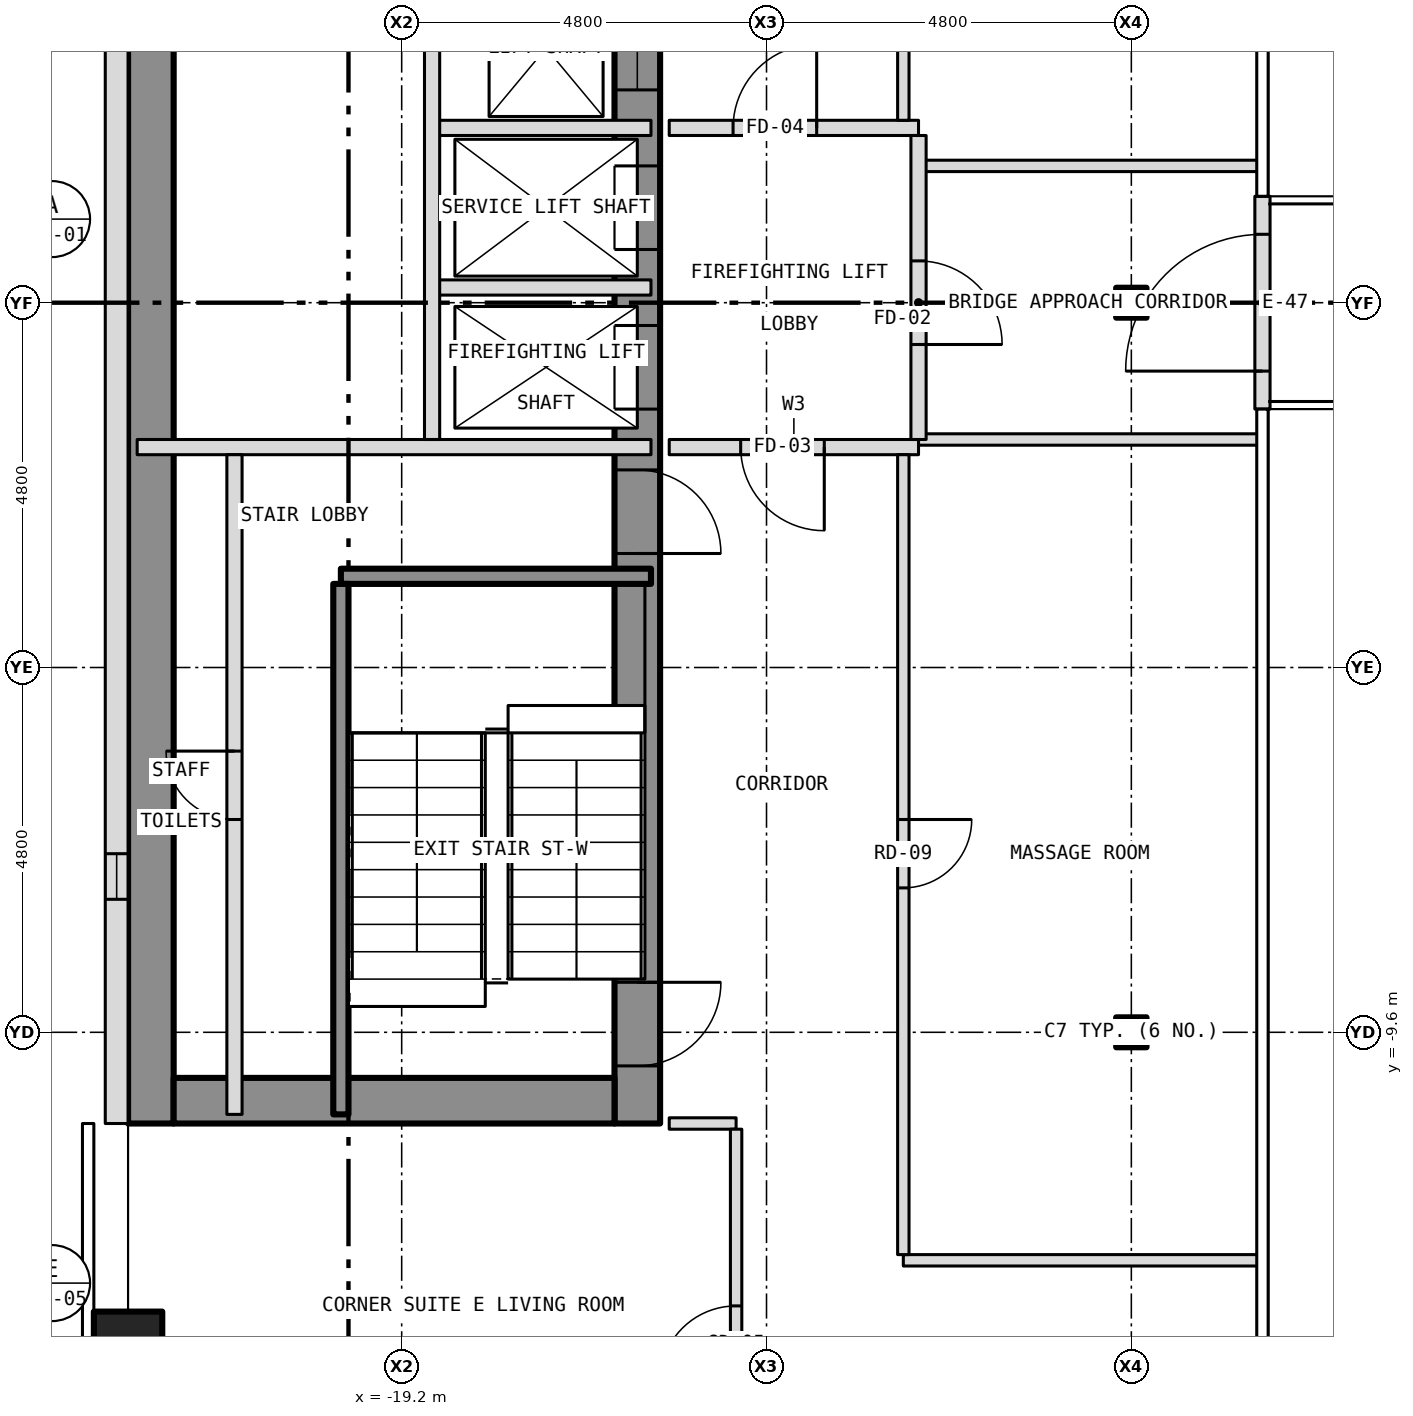
"""IFC4 building model, lengths in metres.
Left out: names, types, materials, properties, quantities, classifications, styles, units other than length and angle.
Written with IfcOpenShell. Run it as: python <this file> out.ifc"""

import sys

from ifc_helpers import new_model, si_unit, direction, frame, frame_2d, origin, origin_2d, place, context, subcontext, project, spatial, rectangle, hollow_rectangle, i_section, extrude, element, fill, save


model = new_model("IFC4")
c1 = context("Model", 3, precision=1e-05, world=origin(), true_north=direction((0.0, 1.0)))
c2 = subcontext(c1, "Body", "Model", "MODEL_VIEW")
j1 = project(units=[si_unit("LENGTHUNIT", "METRE"), si_unit("PLANEANGLEUNIT", "RADIAN")], contexts=[c1])
p1 = place(None, origin())
s1 = spatial("IfcSite", under=j1, at=p1, CompositionType="ELEMENT")
p2 = place(p1, origin())
s2 = spatial("IfcBuilding", under=s1, at=p2, CompositionType="ELEMENT")
p3 = place(p2, frame((0.0, 0.0, 120.5)))
s3 = spatial("IfcBuildingStorey", under=s2, at=p3, CompositionType="ELEMENT", Elevation=120.5)
p4 = place(p3, frame((-22.8, -13.725, -0.15), z_axis=(0.0, 0.0, 1.0), x_axis=(1.0, 0.0, 0.0)))
e1 = element("IfcColumn", 1, at=p4, inside=s3, PredefinedType="COLUMN", context=c2, shape_type="SweptSolid", body=[
    extrude(hollow_rectangle(XDim=0.9, YDim=0.9, WallThickness=0.05, at=origin_2d()), origin(), (0.0, 0.0, 1.0), 3.5),
])
for number, where, z_axis, x_axis in (
    (2, (-9.6, -9.6, -0.15), (0.0, 0.0, 1.0), (1.0, 0.0, 0.0)),
    (3, (-9.6, 0.0, -0.15), (0.0, 0.0, 1.0), (1.0, 0.0, 0.0)),
):
    element("IfcColumn", number, at=place(p3, frame(where, z_axis=z_axis, x_axis=x_axis)), inside=s3, PredefinedType="COLUMN", context=c2, shape_type="SweptSolid", body=[
        extrude(i_section(OverallWidth=0.399, OverallDepth=0.394, WebThickness=0.023, FlangeThickness=0.037, at=origin_2d()), origin(), (0.0, 0.0, 1.0), 3.5),
    ])
p5 = place(p3, frame((-16.1, -10.8, 0.0), z_axis=(0.0, 0.0, 1.0), x_axis=(0.0, 1.0, 0.0)))
e4 = element("IfcWall", 4, at=p5, inside=s3, PredefinedType="SHEAR", context=c2, shape_type="SweptSolid", body=[
    extrude(rectangle(XDim=21.6, YDim=0.6, at=frame_2d((10.8, 0.0))), origin(), (0.0, 0.0, 1.0), 3.25),
])
p6 = place(p5, frame((9.4, 0.0, 0.0)))
e5 = element("IfcOpeningElement", 5, at=p6, cuts=e4, PredefinedType="OPENING", context=c2, shape_type="SweptSolid", body=[
    extrude(rectangle(XDim=1.1, YDim=2.1, at=frame_2d((0.55, 1.05))), frame((0.0, 0.312, 0.0), z_axis=(0.0, -1.0, 0.0), x_axis=(1.0, 0.0, 0.0)), (0.0, 0.0, 1.0), 0.624),
])
p7 = place(p5, frame((11.5, 0.0, 0.0)))
e6 = element("IfcOpeningElement", 6, at=p7, cuts=e4, PredefinedType="OPENING", context=c2, shape_type="SweptSolid", body=[
    extrude(rectangle(XDim=1.1, YDim=2.1, at=frame_2d((0.55, 1.05))), frame((0.0, 0.312, 0.0), z_axis=(0.0, -1.0, 0.0), x_axis=(1.0, 0.0, 0.0)), (0.0, 0.0, 1.0), 0.624),
])
p8 = place(p5, frame((13.6, 0.0, 0.0)))
e7 = element("IfcOpeningElement", 7, at=p8, cuts=e4, PredefinedType="OPENING", context=c2, shape_type="SweptSolid", body=[
    extrude(rectangle(XDim=1.1, YDim=2.1, at=frame_2d((0.55, 1.05))), frame((0.0, 0.312, 0.0), z_axis=(0.0, -1.0, 0.0), x_axis=(1.0, 0.0, 0.0)), (0.0, 0.0, 1.0), 0.624),
])
p9 = place(p5, frame((15.7, 0.0, 0.0)))
e8 = element("IfcOpeningElement", 8, at=p9, cuts=e4, PredefinedType="OPENING", context=c2, shape_type="SweptSolid", body=[
    extrude(rectangle(XDim=1.1, YDim=2.1, at=frame_2d((0.55, 1.05))), frame((0.0, 0.312, 0.0), z_axis=(0.0, -1.0, 0.0), x_axis=(1.0, 0.0, 0.0)), (0.0, 0.0, 1.0), 0.624),
])
p10 = place(p5, frame((17.8, 0.0, 0.0)))
e9 = element("IfcOpeningElement", 9, at=p10, cuts=e4, PredefinedType="OPENING", context=c2, shape_type="SweptSolid", body=[
    extrude(rectangle(XDim=1.1, YDim=2.1, at=frame_2d((0.55, 1.05))), frame((0.0, 0.312, 0.0), z_axis=(0.0, -1.0, 0.0), x_axis=(1.0, 0.0, 0.0)), (0.0, 0.0, 1.0), 0.624),
])
p11 = place(p5, frame((0.758, 0.0, 0.0)))
e10 = element("IfcOpeningElement", 10, at=p11, cuts=e4, PredefinedType="OPENING", context=c2, shape_type="SweptSolid", body=[
    extrude(rectangle(XDim=1.1, YDim=2.1, at=frame_2d((0.55, 1.05))), frame((0.0, 0.312, 0.0), z_axis=(0.0, -1.0, 0.0), x_axis=(1.0, 0.0, 0.0)), (0.0, 0.0, 1.0), 0.624),
])
p12 = place(p5, frame((7.5, 0.0, 0.0)))
e11 = element("IfcOpeningElement", 11, at=p12, cuts=e4, PredefinedType="OPENING", context=c2, shape_type="SweptSolid", body=[
    extrude(rectangle(XDim=1.1, YDim=2.1, at=frame_2d((0.55, 1.05))), frame((0.0, 0.312, 0.0), z_axis=(0.0, -1.0, 0.0), x_axis=(1.0, 0.0, 0.0)), (0.0, 0.0, 1.0), 0.624),
])
p13 = place(p3, frame((-22.5, -10.8, 0.0), z_axis=(0.0, 0.0, 1.0), x_axis=(0.0, 1.0, 0.0)))
e12 = element("IfcWall", 12, at=p13, inside=s3, PredefinedType="SHEAR", context=c2, shape_type="SweptSolid", body=[
    extrude(rectangle(XDim=21.6, YDim=0.6, at=frame_2d((10.8, 0.0))), origin(), (0.0, 0.0, 1.0), 3.25),
])
p14 = place(p3, frame((-22.2, -10.5, 0.0), z_axis=(0.0, 0.0, 1.0), x_axis=(1.0, 0.0, 0.0)))
e13 = element("IfcWall", 13, at=p14, inside=s3, PredefinedType="SHEAR", context=c2, shape_type="SweptSolid", body=[
    extrude(rectangle(XDim=5.8, YDim=0.6, at=frame_2d((2.9, 0.0))), origin(), (0.0, 0.0, 1.0), 3.25),
])
p15 = place(p3, frame((-22.95, 10.8, 0.0), z_axis=(0.0, 0.0, 1.0), x_axis=(0.0, -1.0, 0.0)))
e14 = element("IfcWall", 14, at=p15, inside=s3, PredefinedType="SOLIDWALL", context=c2, shape_type="SweptSolid", body=[
    extrude(rectangle(XDim=21.6, YDim=0.3, at=frame_2d((10.8, 0.0))), origin(), (0.0, 0.0, 1.0), 3.5),
])
p16 = place(p15, frame((18.05, 0.0, 1.0)))
e15 = element("IfcOpeningElement", 15, at=p16, cuts=e14, PredefinedType="OPENING", context=c2, shape_type="SweptSolid", body=[
    extrude(rectangle(XDim=0.6, YDim=1.5, at=frame_2d((0.3, 0.75))), frame((0.0, 0.162, 0.0), z_axis=(0.0, -1.0, 0.0), x_axis=(1.0, 0.0, 0.0)), (0.0, 0.0, 1.0), 0.324),
])
p17 = place(p3, frame((-7.875, -1.4, 0.0), z_axis=(0.0, 0.0, 1.0), x_axis=(0.0, 1.0, 0.0)))
e16 = element("IfcWall", 16, at=p17, inside=s3, PredefinedType="SOLIDWALL", context=c2, shape_type="SweptSolid", body=[
    extrude(rectangle(XDim=2.8, YDim=0.2, at=frame_2d((1.4, 0.0))), origin(), (0.0, 0.0, 1.0), 3.5),
])
p18 = place(p17, frame((0.5, 0.0, 0.0)))
e17 = element("IfcOpeningElement", 17, at=p18, cuts=e16, PredefinedType="OPENING", context=c2, shape_type="SweptSolid", body=[
    extrude(rectangle(XDim=1.8, YDim=2.1, at=frame_2d((0.9, 1.05))), frame((0.0, 0.112, 0.0), z_axis=(0.0, -1.0, 0.0), x_axis=(1.0, 0.0, 0.0)), (0.0, 0.0, 1.0), 0.224),
])
p19 = place(p3, frame((-12.6, -12.6, 0.0), z_axis=(0.0, 0.0, 1.0), x_axis=(1.0, 0.0, 0.0)))
e18 = element("IfcWall", 18, at=p19, inside=s3, PredefinedType="PARTITIONING", context=c2, shape_type="SweptSolid", body=[
    extrude(rectangle(XDim=4.68, YDim=0.15, at=frame_2d((2.34, 0.0))), origin(), (0.0, 0.0, 1.0), 3.35),
])
p20 = place(p3, frame((-15.68, -10.8, 0.0), z_axis=(0.0, 0.0, 1.0), x_axis=(1.0, 0.0, 0.0)))
e19 = element("IfcWall", 19, at=p20, inside=s3, PredefinedType="PARTITIONING", context=c2, shape_type="SweptSolid", body=[
    extrude(rectangle(XDim=0.88, YDim=0.15, at=frame_2d((0.44, 0.0))), origin(), (0.0, 0.0, 1.0), 3.35),
])
p21 = place(p3, frame((-20.0, -3.6, 0.0), z_axis=(0.0, 0.0, 1.0), x_axis=(1.0, 0.0, 0.0)))
e20 = element("IfcWall", 20, at=p21, inside=s3, PredefinedType="SHEAR", context=c2, shape_type="SweptSolid", body=[
    extrude(rectangle(XDim=4.08, YDim=0.2, at=frame_2d((2.04, 0.0))), origin(), (0.0, 0.0, 1.0), 3.25),
])
p22 = place(p3, frame((-22.68, -1.9, 0.0), z_axis=(0.0, 0.0, 1.0), x_axis=(1.0, 0.0, 0.0)))
e21 = element("IfcWall", 21, at=p22, inside=s3, PredefinedType="PARTITIONING", context=c2, shape_type="SweptSolid", body=[
    extrude(rectangle(XDim=6.76, YDim=0.2, at=frame_2d((3.38, 0.0))), origin(), (0.0, 0.0, 1.0), 3.25),
])
p23 = place(p3, frame((-15.68, -1.9, 0.0), z_axis=(0.0, 0.0, 1.0), x_axis=(1.0, 0.0, 0.0)))
e22 = element("IfcWall", 22, at=p23, inside=s3, PredefinedType="PARTITIONING", context=c2, shape_type="SweptSolid", body=[
    extrude(rectangle(XDim=3.28, YDim=0.2, at=frame_2d((1.64, 0.0))), origin(), (0.0, 0.0, 1.0), 3.35),
])
p24 = place(p23, frame((0.94, 0.0, 0.0)))
e23 = element("IfcOpeningElement", 23, at=p24, cuts=e22, PredefinedType="OPENING", context=c2, shape_type="SweptSolid", body=[
    extrude(rectangle(XDim=1.1, YDim=2.1, at=frame_2d((0.55, 1.05))), frame((0.0, 0.112, 0.0), z_axis=(0.0, -1.0, 0.0), x_axis=(1.0, 0.0, 0.0)), (0.0, 0.0, 1.0), 0.224),
])
p25 = place(p3, frame((-12.4, -1.8, 0.0), z_axis=(0.0, 0.0, 1.0), x_axis=(1.0, 0.0, 0.0)))
e24 = element("IfcWall", 24, at=p25, inside=s3, PredefinedType="PARTITIONING", context=c2, shape_type="SweptSolid", body=[
    extrude(rectangle(XDim=4.48, YDim=0.15, at=frame_2d((2.24, 0.0))), origin(), (0.0, 0.0, 1.0), 3.35),
])
p26 = place(p3, frame((-18.8, 0.2, 0.0), z_axis=(0.0, 0.0, 1.0), x_axis=(1.0, 0.0, 0.0)))
e25 = element("IfcWall", 25, at=p26, inside=s3, PredefinedType="PARTITIONING", context=c2, shape_type="SweptSolid", body=[
    extrude(rectangle(XDim=2.88, YDim=0.2, at=frame_2d((1.44, 0.0))), origin(), (0.0, 0.0, 1.0), 3.25),
])
p27 = place(p3, frame((-12.4, 1.8, 0.0), z_axis=(0.0, 0.0, 1.0), x_axis=(1.0, 0.0, 0.0)))
e26 = element("IfcWall", 26, at=p27, inside=s3, PredefinedType="PARTITIONING", context=c2, shape_type="SweptSolid", body=[
    extrude(rectangle(XDim=4.48, YDim=0.15, at=frame_2d((2.24, 0.0))), origin(), (0.0, 0.0, 1.0), 3.35),
])
p28 = place(p3, frame((-18.8, 2.3, 0.0), z_axis=(0.0, 0.0, 1.0), x_axis=(1.0, 0.0, 0.0)))
e27 = element("IfcWall", 27, at=p28, inside=s3, PredefinedType="PARTITIONING", context=c2, shape_type="SweptSolid", body=[
    extrude(rectangle(XDim=2.88, YDim=0.2, at=frame_2d((1.44, 0.0))), origin(), (0.0, 0.0, 1.0), 3.25),
])
p29 = place(p3, frame((-15.68, 2.3, 0.0), z_axis=(0.0, 0.0, 1.0), x_axis=(1.0, 0.0, 0.0)))
e28 = element("IfcWall", 28, at=p29, inside=s3, PredefinedType="PARTITIONING", context=c2, shape_type="SweptSolid", body=[
    extrude(rectangle(XDim=3.28, YDim=0.2, at=frame_2d((1.64, 0.0))), origin(), (0.0, 0.0, 1.0), 3.35),
])
p30 = place(p29, frame((0.84, 0.0, 0.0)))
e29 = element("IfcOpeningElement", 29, at=p30, cuts=e28, PredefinedType="OPENING", context=c2, shape_type="SweptSolid", body=[
    extrude(rectangle(XDim=1.1, YDim=2.1, at=frame_2d((0.55, 1.05))), frame((0.0, 0.112, 0.0), z_axis=(0.0, -1.0, 0.0), x_axis=(1.0, 0.0, 0.0)), (0.0, 0.0, 1.0), 0.224),
])
p31 = place(p3, frame((-21.4, -10.68, 0.0), z_axis=(0.0, 0.0, 1.0), x_axis=(0.0, 1.0, 0.0)))
e30 = element("IfcWall", 30, at=p31, inside=s3, PredefinedType="PARTITIONING", context=c2, shape_type="SweptSolid", body=[
    extrude(rectangle(XDim=8.68, YDim=0.2, at=frame_2d((4.34, 0.0))), origin(), (0.0, 0.0, 1.0), 3.25),
])
p32 = place(p31, frame((3.88, 0.0, 0.0)))
e31 = element("IfcOpeningElement", 31, at=p32, cuts=e30, PredefinedType="OPENING", context=c2, shape_type="SweptSolid", body=[
    extrude(rectangle(XDim=0.9, YDim=2.1, at=frame_2d((0.45, 1.05))), frame((0.0, 0.112, 0.0), z_axis=(0.0, -1.0, 0.0), x_axis=(1.0, 0.0, 0.0)), (0.0, 0.0, 1.0), 0.224),
])
p33 = place(p3, frame((-20.0, -10.68, 0.0), z_axis=(0.0, 0.0, 1.0), x_axis=(0.0, 1.0, 0.0)))
e32 = element("IfcWall", 32, at=p33, inside=s3, PredefinedType="SHEAR", context=c2, shape_type="SweptSolid", body=[
    extrude(rectangle(XDim=6.98, YDim=0.2, at=frame_2d((3.49, 0.0))), origin(), (0.0, 0.0, 1.0), 3.25),
])
p34 = place(p3, frame((-18.8, -1.8, 0.0), z_axis=(0.0, 0.0, 1.0), x_axis=(0.0, 1.0, 0.0)))
e33 = element("IfcWall", 33, at=p34, inside=s3, PredefinedType="PARTITIONING", context=c2, shape_type="SweptSolid", body=[
    extrude(rectangle(XDim=12.48, YDim=0.2, at=frame_2d((6.24, 0.0))), origin(), (0.0, 0.0, 1.0), 3.25),
])
p35 = place(p3, frame((-14.8, -14.725, 0.0), z_axis=(0.0, 0.0, 1.0), x_axis=(0.0, 1.0, 0.0)))
e34 = element("IfcWall", 34, at=p35, inside=s3, PredefinedType="PARTITIONING", context=c2, shape_type="SweptSolid", body=[
    extrude(rectangle(XDim=3.85, YDim=0.15, at=frame_2d((1.925, 0.0))), origin(), (0.0, 0.0, 1.0), 3.35),
])
p36 = place(p35, frame((0.525, 0.0, 0.0)))
e35 = element("IfcOpeningElement", 35, at=p36, cuts=e34, PredefinedType="OPENING", context=c2, shape_type="SweptSolid", body=[
    extrude(rectangle(XDim=1.0, YDim=2.1, at=frame_2d((0.5, 1.05))), frame((0.0, 0.087, 0.0), z_axis=(0.0, -1.0, 0.0), x_axis=(1.0, 0.0, 0.0)), (0.0, 0.0, 1.0), 0.174),
])
p37 = place(p3, frame((-12.6, -12.525, 0.0), z_axis=(0.0, 0.0, 1.0), x_axis=(0.0, 1.0, 0.0)))
e36 = element("IfcWall", 36, at=p37, inside=s3, PredefinedType="PARTITIONING", context=c2, shape_type="SweptSolid", body=[
    extrude(rectangle(XDim=10.525, YDim=0.15, at=frame_2d((5.262, 0.0))), origin(), (0.0, 0.0, 1.0), 3.35),
])
p38 = place(p37, frame((4.825, 0.0, 0.0)))
e37 = element("IfcOpeningElement", 37, at=p38, cuts=e36, PredefinedType="OPENING", context=c2, shape_type="SweptSolid", body=[
    extrude(rectangle(XDim=0.9, YDim=2.1, at=frame_2d((0.45, 1.05))), frame((0.0, 0.087, 0.0), z_axis=(0.0, -1.0, 0.0), x_axis=(1.0, 0.0, 0.0)), (0.0, 0.0, 1.0), 0.174),
])
p39 = place(p3, frame((-12.6, 2.4, 0.0), z_axis=(0.0, 0.0, 1.0), x_axis=(0.0, 1.0, 0.0)))
e38 = element("IfcWall", 38, at=p39, inside=s3, PredefinedType="PARTITIONING", context=c2, shape_type="SweptSolid", body=[
    extrude(rectangle(XDim=3.425, YDim=0.15, at=frame_2d((1.712, 0.0))), origin(), (0.0, 0.0, 1.0), 3.35),
])
p40 = place(p3, frame((-12.4, -1.8, 0.0), z_axis=(0.0, 0.0, 1.0), x_axis=(0.0, 1.0, 0.0)))
e39 = element("IfcWall", 39, at=p40, inside=s3, PredefinedType="PARTITIONING", context=c2, shape_type="SweptSolid", body=[
    extrude(rectangle(XDim=4.0, YDim=0.2, at=frame_2d((2.0, 0.0))), origin(), (0.0, 0.0, 1.0), 3.35),
])
p41 = place(p40, frame((1.25, 0.0, 0.0)))
e40 = element("IfcOpeningElement", 40, at=p41, cuts=e39, PredefinedType="OPENING", context=c2, shape_type="SweptSolid", body=[
    extrude(rectangle(XDim=1.1, YDim=2.1, at=frame_2d((0.55, 1.05))), frame((0.0, 0.112, 0.0), z_axis=(0.0, -1.0, 0.0), x_axis=(1.0, 0.0, 0.0)), (0.0, 0.0, 1.0), 0.224),
])
p42 = place(p16, origin())
e41 = element("IfcWindow", 41, at=p42, inside=s3, PartitioningType="SINGLE_PANEL", PredefinedType="WINDOW", context=c2, shape_type="SweptSolid", body=[
    extrude(rectangle(XDim=0.6, YDim=1.5, at=frame_2d((0.3, 0.75))), frame((0.0, -0.06, 0.0), z_axis=(0.0, -1.0, 0.0), x_axis=(1.0, 0.0, 0.0)), (0.0, 0.0, 1.0), 0.06),
])
fill(e15, e41)
p43 = place(p18, origin())
e42 = element("IfcDoor", 42, at=p43, inside=s3, OperationType="DOUBLE_DOOR_DOUBLE_SWING", PredefinedType="DOOR", context=c2, shape_type="SweptSolid", body=[
    extrude(rectangle(XDim=1.8, YDim=2.1, at=frame_2d((0.9, 1.05))), frame((0.0, 0.025, 0.0), z_axis=(0.0, -1.0, 0.0), x_axis=(1.0, 0.0, 0.0)), (0.0, 0.0, 1.0), 0.05),
])
fill(e17, e42)
p44 = place(p6, origin())
e43 = element("IfcDoor", 43, at=p44, inside=s3, OperationType="SLIDING_TO_LEFT", PredefinedType="DOOR", context=c2, shape_type="SweptSolid", body=[
    extrude(rectangle(XDim=1.1, YDim=2.1, at=frame_2d((0.55, 1.05))), frame((0.0, 0.025, 0.0), z_axis=(0.0, -1.0, 0.0), x_axis=(1.0, 0.0, 0.0)), (0.0, 0.0, 1.0), 0.05),
])
fill(e5, e43)
p45 = place(p7, origin())
e44 = element("IfcDoor", 44, at=p45, inside=s3, OperationType="SLIDING_TO_LEFT", PredefinedType="DOOR", context=c2, shape_type="SweptSolid", body=[
    extrude(rectangle(XDim=1.1, YDim=2.1, at=frame_2d((0.55, 1.05))), frame((0.0, 0.025, 0.0), z_axis=(0.0, -1.0, 0.0), x_axis=(1.0, 0.0, 0.0)), (0.0, 0.0, 1.0), 0.05),
])
fill(e6, e44)
p46 = place(p8, origin())
e45 = element("IfcDoor", 45, at=p46, inside=s3, OperationType="SLIDING_TO_LEFT", PredefinedType="DOOR", context=c2, shape_type="SweptSolid", body=[
    extrude(rectangle(XDim=1.1, YDim=2.1, at=frame_2d((0.55, 1.05))), frame((0.0, 0.025, 0.0), z_axis=(0.0, -1.0, 0.0), x_axis=(1.0, 0.0, 0.0)), (0.0, 0.0, 1.0), 0.05),
])
fill(e7, e45)
p47 = place(p11, origin())
e46 = element("IfcDoor", 46, at=p47, inside=s3, OperationType="SINGLE_SWING_RIGHT", PredefinedType="DOOR", context=c2, shape_type="SweptSolid", body=[
    extrude(rectangle(XDim=1.1, YDim=2.1, at=frame_2d((0.55, 1.05))), frame((0.0, 0.025, 0.0), z_axis=(0.0, -1.0, 0.0), x_axis=(1.0, 0.0, 0.0)), (0.0, 0.0, 1.0), 0.05),
])
fill(e10, e46)
p48 = place(p12, origin())
e47 = element("IfcDoor", 47, at=p48, inside=s3, OperationType="SINGLE_SWING_LEFT", PredefinedType="DOOR", context=c2, shape_type="SweptSolid", body=[
    extrude(rectangle(XDim=1.1, YDim=2.1, at=frame_2d((0.55, 1.05))), frame((0.0, 0.025, 0.0), z_axis=(0.0, -1.0, 0.0), x_axis=(1.0, 0.0, 0.0)), (0.0, 0.0, 1.0), 0.05),
])
fill(e11, e47)
p49 = place(p32, origin())
e48 = element("IfcDoor", 48, at=p49, inside=s3, OperationType="SINGLE_SWING_RIGHT", PredefinedType="DOOR", context=c2, shape_type="SweptSolid", body=[
    extrude(rectangle(XDim=0.9, YDim=2.1, at=frame_2d((0.45, 1.05))), frame((0.0, 0.025, 0.0), z_axis=(0.0, -1.0, 0.0), x_axis=(1.0, 0.0, 0.0)), (0.0, 0.0, 1.0), 0.05),
])
fill(e31, e48)
p50 = place(p41, origin())
e49 = element("IfcDoor", 49, at=p50, inside=s3, OperationType="SINGLE_SWING_LEFT", PredefinedType="DOOR", context=c2, shape_type="SweptSolid", body=[
    extrude(rectangle(XDim=1.1, YDim=2.1, at=frame_2d((0.55, 1.05))), frame((0.0, 0.025, 0.0), z_axis=(0.0, -1.0, 0.0), x_axis=(1.0, 0.0, 0.0)), (0.0, 0.0, 1.0), 0.05),
])
fill(e40, e49)
p51 = place(p24, origin())
e50 = element("IfcDoor", 50, at=p51, inside=s3, OperationType="SINGLE_SWING_RIGHT", PredefinedType="DOOR", context=c2, shape_type="SweptSolid", body=[
    extrude(rectangle(XDim=1.1, YDim=2.1, at=frame_2d((0.55, 1.05))), frame((0.0, 0.025, 0.0), z_axis=(0.0, -1.0, 0.0), x_axis=(1.0, 0.0, 0.0)), (0.0, 0.0, 1.0), 0.05),
])
fill(e23, e50)
p52 = place(p30, origin())
e51 = element("IfcDoor", 51, at=p52, inside=s3, OperationType="SINGLE_SWING_RIGHT", PredefinedType="DOOR", context=c2, shape_type="SweptSolid", body=[
    extrude(rectangle(XDim=1.1, YDim=2.1, at=frame_2d((0.55, 1.05))), frame((0.0, 0.025, 0.0), z_axis=(0.0, -1.0, 0.0), x_axis=(1.0, 0.0, 0.0)), (0.0, 0.0, 1.0), 0.05),
])
fill(e29, e51)
p53 = place(p36, origin())
e52 = element("IfcDoor", 52, at=p53, inside=s3, OperationType="SINGLE_SWING_LEFT", PredefinedType="DOOR", context=c2, shape_type="SweptSolid", body=[
    extrude(rectangle(XDim=1.0, YDim=2.1, at=frame_2d((0.5, 1.05))), frame((0.0, 0.025, 0.0), z_axis=(0.0, -1.0, 0.0), x_axis=(1.0, 0.0, 0.0)), (0.0, 0.0, 1.0), 0.05),
])
fill(e35, e52)
p54 = place(p38, origin())
e53 = element("IfcDoor", 53, at=p54, inside=s3, OperationType="SINGLE_SWING_RIGHT", PredefinedType="DOOR", context=c2, shape_type="SweptSolid", body=[
    extrude(rectangle(XDim=0.9, YDim=2.1, at=frame_2d((0.45, 1.05))), frame((0.0, 0.025, 0.0), z_axis=(0.0, -1.0, 0.0), x_axis=(1.0, 0.0, 0.0)), (0.0, 0.0, 1.0), 0.05),
])
fill(e37, e53)
save(model, sys.argv[1])
